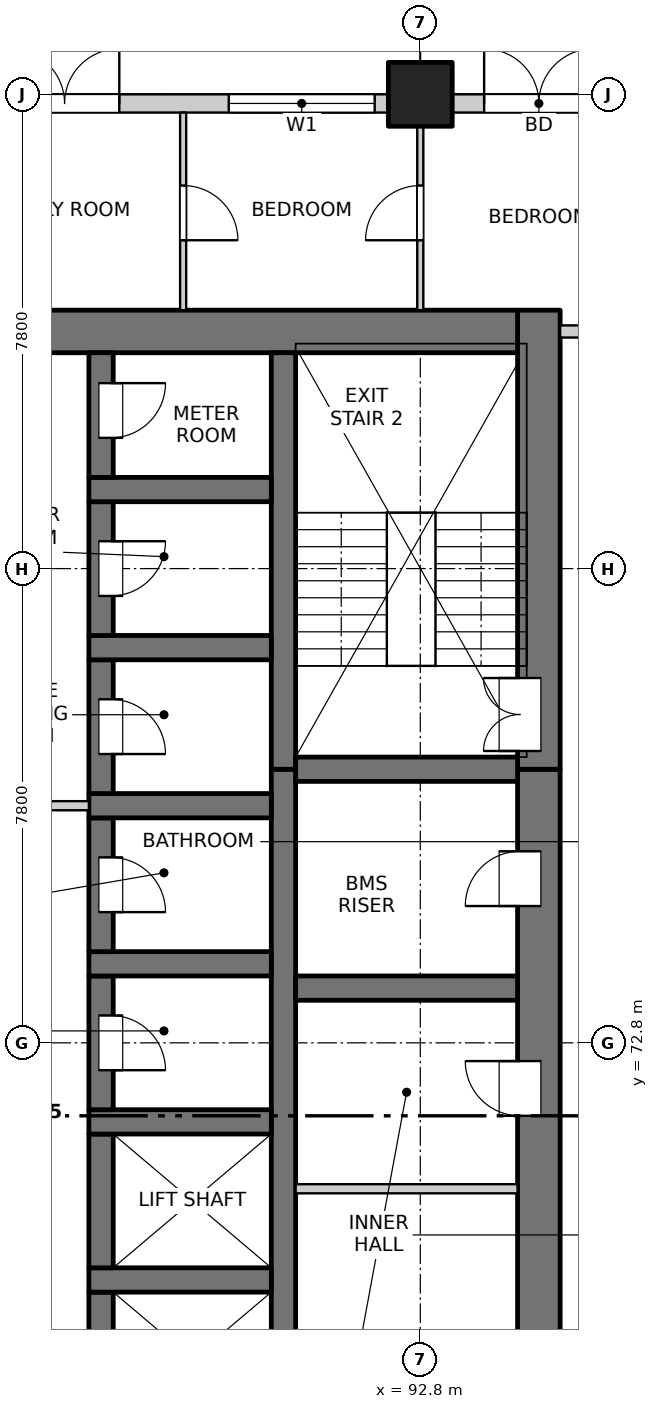
"""IFC4 building model, lengths in metres.
Left out: names, types, materials, properties, quantities, classifications, styles, units other than length and angle.
Written with IfcOpenShell. Run it as: python <this file> out.ifc"""

import sys

from ifc_helpers import new_model, si_unit, direction, frame, frame_2d, origin, origin_2d, place, context, subcontext, project, spatial, rectangle, extrude, element, fill, save


model = new_model("IFC4")
c1 = context("Model", 3, precision=1e-05, world=origin(), true_north=direction((0.0, 1.0)))
c2 = subcontext(c1, "Body", "Model", "MODEL_VIEW")
j1 = project(units=[si_unit("LENGTHUNIT", "METRE"), si_unit("PLANEANGLEUNIT", "RADIAN")], contexts=[c1])
p1 = place(None, origin())
s1 = spatial("IfcSite", under=j1, at=p1, CompositionType="ELEMENT")
p2 = place(p1, origin())
s2 = spatial("IfcBuilding", under=s1, at=p2, CompositionType="ELEMENT")
p3 = place(p2, frame((0.0, 0.0, 39.9)))
s3 = spatial("IfcBuildingStorey", under=s2, at=p3, CompositionType="ELEMENT", Elevation=39.9)
p4 = place(p3, frame((92.8, 88.4, -0.25), z_axis=(0.0, 0.0, 1.0), x_axis=(1.0, 0.0, 0.0)))
e1 = element("IfcColumn", 1, at=p4, inside=s3, PredefinedType="COLUMN", context=c2, shape_type="SweptSolid", body=[
    extrude(rectangle(XDim=1.05, YDim=1.05, at=origin_2d()), origin(), (0.0, 0.0, 1.0), 3.4),
])
p5 = place(p3, frame((94.75, 61.95, -0.25), z_axis=(0.0, 0.0, 1.0), x_axis=(0.0, 1.0, 0.0)))
e2 = element("IfcWall", 2, at=p5, inside=s3, PredefinedType="SOLIDWALL", context=c2, shape_type="SweptSolid", body=[
    extrude(rectangle(XDim=15.35, YDim=0.7, at=frame_2d((7.675, 0.0))), origin(), (0.0, 0.0, 1.0), 3.4),
])
p6 = place(p5, frame((0.925, 0.0, 0.25)))
e3 = element("IfcOpeningElement", 3, at=p6, cuts=e2, PredefinedType="OPENING", context=c2, shape_type="SweptSolid", body=[
    extrude(rectangle(XDim=0.9, YDim=2.1, at=frame_2d((0.45, 1.05))), frame((0.0, 0.36, 0.0), z_axis=(0.0, -1.0, 0.0), x_axis=(1.0, 0.0, 0.0)), (0.0, 0.0, 1.0), 0.72),
])
p7 = place(p5, frame((5.15, 0.0, 0.25)))
e4 = element("IfcOpeningElement", 4, at=p7, cuts=e2, PredefinedType="OPENING", context=c2, shape_type="SweptSolid", body=[
    extrude(rectangle(XDim=0.9, YDim=2.1, at=frame_2d((0.45, 1.05))), frame((0.0, 0.36, 0.0), z_axis=(0.0, -1.0, 0.0), x_axis=(1.0, 0.0, 0.0)), (0.0, 0.0, 1.0), 0.72),
])
p8 = place(p5, frame((9.65, 0.0, 0.25)))
e5 = element("IfcOpeningElement", 5, at=p8, cuts=e2, PredefinedType="OPENING", context=c2, shape_type="SweptSolid", body=[
    extrude(rectangle(XDim=0.9, YDim=2.1, at=frame_2d((0.45, 1.05))), frame((0.0, 0.36, 0.0), z_axis=(0.0, -1.0, 0.0), x_axis=(1.0, 0.0, 0.0)), (0.0, 0.0, 1.0), 0.72),
])
p9 = place(p5, frame((13.1, 0.0, 0.25)))
e6 = element("IfcOpeningElement", 6, at=p9, cuts=e2, PredefinedType="OPENING", context=c2, shape_type="SweptSolid", body=[
    extrude(rectangle(XDim=0.9, YDim=2.1, at=frame_2d((0.45, 1.05))), frame((0.0, 0.36, 0.0), z_axis=(0.0, -1.0, 0.0), x_axis=(1.0, 0.0, 0.0)), (0.0, 0.0, 1.0), 0.72),
])
p10 = place(p3, frame((94.75, 77.3, -0.25), z_axis=(0.0, 0.0, 1.0), x_axis=(0.0, 1.0, 0.0)))
e7 = element("IfcWall", 7, at=p10, inside=s3, PredefinedType="SOLIDWALL", context=c2, shape_type="SweptSolid", body=[
    extrude(rectangle(XDim=7.55, YDim=0.7, at=frame_2d((3.775, 0.0))), origin(), (0.0, 0.0, 1.0), 3.4),
])
p11 = place(p10, frame((0.3, 0.0, 0.25)))
e8 = element("IfcOpeningElement", 8, at=p11, cuts=e7, PredefinedType="OPENING", context=c2, shape_type="SweptSolid", body=[
    extrude(rectangle(XDim=1.2, YDim=2.1, at=frame_2d((0.6, 1.05))), frame((0.0, 0.36, 0.0), z_axis=(0.0, -1.0, 0.0), x_axis=(1.0, 0.0, 0.0)), (0.0, 0.0, 1.0), 0.72),
])
p12 = place(p3, frame((75.6, 84.5, -0.25), z_axis=(0.0, 0.0, 1.0), x_axis=(1.0, 0.0, 0.0)))
e9 = element("IfcWall", 9, at=p12, inside=s3, PredefinedType="SOLIDWALL", context=c2, shape_type="SweptSolid", body=[
    extrude(rectangle(XDim=18.8, YDim=0.7, at=frame_2d((9.4, 0.0))), origin(), (0.0, 0.0, 1.0), 3.4),
])
p13 = place(p3, frame((90.55, 61.95, -0.25), z_axis=(0.0, 0.0, 1.0), x_axis=(0.0, 1.0, 0.0)))
e10 = element("IfcWall", 10, at=p13, inside=s3, PredefinedType="SOLIDWALL", context=c2, shape_type="SweptSolid", body=[
    extrude(rectangle(XDim=15.35, YDim=0.4, at=frame_2d((7.675, 0.0))), origin(), (0.0, 0.0, 1.0), 3.4),
])
p14 = place(p3, frame((90.55, 77.3, -0.25), z_axis=(0.0, 0.0, 1.0), x_axis=(0.0, 1.0, 0.0)))
e11 = element("IfcWall", 11, at=p14, inside=s3, PredefinedType="SOLIDWALL", context=c2, shape_type="SweptSolid", body=[
    extrude(rectangle(XDim=6.85, YDim=0.4, at=frame_2d((3.425, 0.0))), origin(), (0.0, 0.0, 1.0), 3.4),
])
p15 = place(p3, frame((87.55, 66.5, -0.25), z_axis=(0.0, 0.0, 1.0), x_axis=(0.0, 1.0, 0.0)))
e12 = element("IfcWall", 12, at=p15, inside=s3, PredefinedType="SOLIDWALL", context=c2, shape_type="SweptSolid", body=[
    extrude(rectangle(XDim=2.2, YDim=0.4, at=frame_2d((1.1, 0.0))), origin(), (0.0, 0.0, 1.0), 3.4),
])
p16 = place(p3, frame((87.35, 68.9, -0.25), z_axis=(0.0, 0.0, 1.0), x_axis=(1.0, 0.0, 0.0)))
e13 = element("IfcWall", 13, at=p16, inside=s3, PredefinedType="SOLIDWALL", context=c2, shape_type="SweptSolid", body=[
    extrude(rectangle(XDim=3.0, YDim=0.4, at=frame_2d((1.5, 0.0))), origin(), (0.0, 0.0, 1.0), 3.4),
])
p17 = place(p3, frame((87.55, 69.1, -0.25), z_axis=(0.0, 0.0, 1.0), x_axis=(0.0, 1.0, 0.0)))
e14 = element("IfcWall", 14, at=p17, inside=s3, PredefinedType="SOLIDWALL", context=c2, shape_type="SweptSolid", body=[
    extrude(rectangle(XDim=2.2, YDim=0.4, at=frame_2d((1.1, 0.0))), origin(), (0.0, 0.0, 1.0), 3.4),
])
p18 = place(p3, frame((87.35, 71.5, -0.25), z_axis=(0.0, 0.0, 1.0), x_axis=(1.0, 0.0, 0.0)))
e15 = element("IfcWall", 15, at=p18, inside=s3, PredefinedType="SOLIDWALL", context=c2, shape_type="SweptSolid", body=[
    extrude(rectangle(XDim=3.0, YDim=0.4, at=frame_2d((1.5, 0.0))), origin(), (0.0, 0.0, 1.0), 3.4),
])
p19 = place(p3, frame((87.55, 71.7, -0.25), z_axis=(0.0, 0.0, 1.0), x_axis=(0.0, 1.0, 0.0)))
e16 = element("IfcWall", 16, at=p19, inside=s3, PredefinedType="SOLIDWALL", context=c2, shape_type="SweptSolid", body=[
    extrude(rectangle(XDim=2.2, YDim=0.4, at=frame_2d((1.1, 0.0))), origin(), (0.0, 0.0, 1.0), 3.4),
])
p20 = place(p19, frame((0.65, 0.0, 0.25)))
e17 = element("IfcOpeningElement", 17, at=p20, cuts=e16, PredefinedType="OPENING", context=c2, shape_type="SweptSolid", body=[
    extrude(rectangle(XDim=0.9, YDim=2.1, at=frame_2d((0.45, 1.05))), frame((0.0, 0.21, 0.0), z_axis=(0.0, -1.0, 0.0), x_axis=(1.0, 0.0, 0.0)), (0.0, 0.0, 1.0), 0.42),
])
p21 = place(p3, frame((87.35, 74.1, -0.25), z_axis=(0.0, 0.0, 1.0), x_axis=(1.0, 0.0, 0.0)))
e18 = element("IfcWall", 18, at=p21, inside=s3, PredefinedType="SOLIDWALL", context=c2, shape_type="SweptSolid", body=[
    extrude(rectangle(XDim=3.0, YDim=0.4, at=frame_2d((1.5, 0.0))), origin(), (0.0, 0.0, 1.0), 3.4),
])
p22 = place(p3, frame((87.55, 74.3, -0.25), z_axis=(0.0, 0.0, 1.0), x_axis=(0.0, 1.0, 0.0)))
e19 = element("IfcWall", 19, at=p22, inside=s3, PredefinedType="SOLIDWALL", context=c2, shape_type="SweptSolid", body=[
    extrude(rectangle(XDim=2.2, YDim=0.4, at=frame_2d((1.1, 0.0))), origin(), (0.0, 0.0, 1.0), 3.4),
])
p23 = place(p22, frame((0.65, 0.0, 0.25)))
e20 = element("IfcOpeningElement", 20, at=p23, cuts=e19, PredefinedType="OPENING", context=c2, shape_type="SweptSolid", body=[
    extrude(rectangle(XDim=0.9, YDim=2.1, at=frame_2d((0.45, 1.05))), frame((0.0, 0.21, 0.0), z_axis=(0.0, -1.0, 0.0), x_axis=(1.0, 0.0, 0.0)), (0.0, 0.0, 1.0), 0.42),
])
p24 = place(p3, frame((87.35, 76.7, -0.25), z_axis=(0.0, 0.0, 1.0), x_axis=(1.0, 0.0, 0.0)))
e21 = element("IfcWall", 21, at=p24, inside=s3, PredefinedType="SOLIDWALL", context=c2, shape_type="SweptSolid", body=[
    extrude(rectangle(XDim=3.0, YDim=0.4, at=frame_2d((1.5, 0.0))), origin(), (0.0, 0.0, 1.0), 3.4),
])
p25 = place(p3, frame((87.55, 76.9, -0.25), z_axis=(0.0, 0.0, 1.0), x_axis=(0.0, 1.0, 0.0)))
e22 = element("IfcWall", 22, at=p25, inside=s3, PredefinedType="SOLIDWALL", context=c2, shape_type="SweptSolid", body=[
    extrude(rectangle(XDim=2.2, YDim=0.4, at=frame_2d((1.1, 0.0))), origin(), (0.0, 0.0, 1.0), 3.4),
])
p26 = place(p25, frame((0.65, 0.0, 0.25)))
e23 = element("IfcOpeningElement", 23, at=p26, cuts=e22, PredefinedType="OPENING", context=c2, shape_type="SweptSolid", body=[
    extrude(rectangle(XDim=0.9, YDim=2.1, at=frame_2d((0.45, 1.05))), frame((0.0, 0.21, 0.0), z_axis=(0.0, -1.0, 0.0), x_axis=(1.0, 0.0, 0.0)), (0.0, 0.0, 1.0), 0.42),
])
p27 = place(p3, frame((87.35, 79.3, -0.25), z_axis=(0.0, 0.0, 1.0), x_axis=(1.0, 0.0, 0.0)))
e24 = element("IfcWall", 24, at=p27, inside=s3, PredefinedType="SOLIDWALL", context=c2, shape_type="SweptSolid", body=[
    extrude(rectangle(XDim=3.0, YDim=0.4, at=frame_2d((1.5, 0.0))), origin(), (0.0, 0.0, 1.0), 3.4),
])
p28 = place(p3, frame((87.55, 79.5, -0.25), z_axis=(0.0, 0.0, 1.0), x_axis=(0.0, 1.0, 0.0)))
e25 = element("IfcWall", 25, at=p28, inside=s3, PredefinedType="SOLIDWALL", context=c2, shape_type="SweptSolid", body=[
    extrude(rectangle(XDim=2.2, YDim=0.4, at=frame_2d((1.1, 0.0))), origin(), (0.0, 0.0, 1.0), 3.4),
])
p29 = place(p28, frame((0.65, 0.0, 0.25)))
e26 = element("IfcOpeningElement", 26, at=p29, cuts=e25, PredefinedType="OPENING", context=c2, shape_type="SweptSolid", body=[
    extrude(rectangle(XDim=0.9, YDim=2.1, at=frame_2d((0.45, 1.05))), frame((0.0, 0.21, 0.0), z_axis=(0.0, -1.0, 0.0), x_axis=(1.0, 0.0, 0.0)), (0.0, 0.0, 1.0), 0.42),
])
p30 = place(p3, frame((87.35, 81.9, -0.25), z_axis=(0.0, 0.0, 1.0), x_axis=(1.0, 0.0, 0.0)))
e27 = element("IfcWall", 27, at=p30, inside=s3, PredefinedType="SOLIDWALL", context=c2, shape_type="SweptSolid", body=[
    extrude(rectangle(XDim=3.0, YDim=0.4, at=frame_2d((1.5, 0.0))), origin(), (0.0, 0.0, 1.0), 3.4),
])
p31 = place(p3, frame((87.55, 82.1, -0.25), z_axis=(0.0, 0.0, 1.0), x_axis=(0.0, 1.0, 0.0)))
e28 = element("IfcWall", 28, at=p31, inside=s3, PredefinedType="SOLIDWALL", context=c2, shape_type="SweptSolid", body=[
    extrude(rectangle(XDim=2.05, YDim=0.4, at=frame_2d((1.025, 0.0))), origin(), (0.0, 0.0, 1.0), 3.4),
])
p32 = place(p31, frame((0.65, 0.0, 0.25)))
e29 = element("IfcOpeningElement", 29, at=p32, cuts=e28, PredefinedType="OPENING", context=c2, shape_type="SweptSolid", body=[
    extrude(rectangle(XDim=0.9, YDim=2.1, at=frame_2d((0.45, 1.05))), frame((0.0, 0.21, 0.0), z_axis=(0.0, -1.0, 0.0), x_axis=(1.0, 0.0, 0.0)), (0.0, 0.0, 1.0), 0.42),
])
for number, where, z_axis, x_axis in (
    (30, (90.75, 73.7, -0.25), (0.0, 0.0, 1.0), (1.0, 0.0, 0.0)),
    (31, (90.75, 77.3, -0.25), (0.0, 0.0, 1.0), (1.0, 0.0, 0.0)),
):
    element("IfcWall", number, at=place(p3, frame(where, z_axis=z_axis, x_axis=x_axis)), inside=s3, PredefinedType="SOLIDWALL", context=c2, shape_type="SweptSolid", body=[
        extrude(rectangle(XDim=3.65, YDim=0.4, at=frame_2d((1.825, 0.0))), origin(), (0.0, 0.0, 1.0), 3.4),
    ])
p33 = place(p3, frame((85.525, 88.25, 0.0), z_axis=(0.0, 0.0, 1.0), x_axis=(1.0, 0.0, 0.0)))
e32 = element("IfcWall", 32, at=p33, inside=s3, PredefinedType="SOLIDWALL", context=c2, shape_type="SweptSolid", body=[
    extrude(rectangle(XDim=6.75, YDim=0.3, at=frame_2d((3.375, 0.0))), origin(), (0.0, 0.0, 1.0), 2.7),
])
p34 = place(p33, frame((0.525, 0.0, 0.0)))
e33 = element("IfcOpeningElement", 33, at=p34, cuts=e32, PredefinedType="OPENING", context=c2, shape_type="SweptSolid", body=[
    extrude(rectangle(XDim=1.8, YDim=2.4, at=frame_2d((0.9, 1.2))), frame((0.0, 0.16, 0.0), z_axis=(0.0, -1.0, 0.0), x_axis=(1.0, 0.0, 0.0)), (0.0, 0.0, 1.0), 0.32),
])
p35 = place(p33, frame((4.125, 0.0, 0.9)))
e34 = element("IfcOpeningElement", 34, at=p35, cuts=e32, PredefinedType="OPENING", context=c2, shape_type="SweptSolid", body=[
    extrude(rectangle(XDim=2.4, YDim=1.8, at=frame_2d((1.2, 0.9))), frame((0.0, 0.16, 0.0), z_axis=(0.0, -1.0, 0.0), x_axis=(1.0, 0.0, 0.0)), (0.0, 0.0, 1.0), 0.32),
])
p36 = place(p3, frame((93.325, 88.25, 0.0), z_axis=(0.0, 0.0, 1.0), x_axis=(1.0, 0.0, 0.0)))
e35 = element("IfcWall", 35, at=p36, inside=s3, PredefinedType="SOLIDWALL", context=c2, shape_type="SweptSolid", body=[
    extrude(rectangle(XDim=6.75, YDim=0.3, at=frame_2d((3.375, 0.0))), origin(), (0.0, 0.0, 1.0), 2.7),
])
p37 = place(p36, frame((0.525, 0.0, 0.0)))
e36 = element("IfcOpeningElement", 36, at=p37, cuts=e35, PredefinedType="OPENING", context=c2, shape_type="SweptSolid", body=[
    extrude(rectangle(XDim=1.8, YDim=2.4, at=frame_2d((0.9, 1.2))), frame((0.0, 0.16, 0.0), z_axis=(0.0, -1.0, 0.0), x_axis=(1.0, 0.0, 0.0)), (0.0, 0.0, 1.0), 0.32),
])
p38 = place(p36, frame((4.125, 0.0, 0.9)))
e37 = element("IfcOpeningElement", 37, at=p38, cuts=e35, PredefinedType="OPENING", context=c2, shape_type="SweptSolid", body=[
    extrude(rectangle(XDim=2.4, YDim=1.8, at=frame_2d((1.2, 0.9))), frame((0.0, 0.16, 0.0), z_axis=(0.0, -1.0, 0.0), x_axis=(1.0, 0.0, 0.0)), (0.0, 0.0, 1.0), 0.32),
])
p39 = place(p3, frame((90.75, 70.4, 0.0), z_axis=(0.0, 0.0, 1.0), x_axis=(1.0, 0.0, 0.0)))
e38 = element("IfcWall", 38, at=p39, inside=s3, PredefinedType="PARTITIONING", context=c2, shape_type="SweptSolid", body=[
    extrude(rectangle(XDim=3.65, YDim=0.15, at=frame_2d((1.825, 0.0))), origin(), (0.0, 0.0, 1.0), 3.15),
])
p40 = place(p3, frame((82.65, 76.7, 0.0), z_axis=(0.0, 0.0, 1.0), x_axis=(1.0, 0.0, 0.0)))
e39 = element("IfcWall", 39, at=p40, inside=s3, PredefinedType="PARTITIONING", context=c2, shape_type="SweptSolid", body=[
    extrude(rectangle(XDim=4.7, YDim=0.15, at=frame_2d((2.35, 0.0))), origin(), (0.0, 0.0, 1.0), 3.15),
])
p41 = place(p40, frame((1.45, 0.0, 0.0)))
e40 = element("IfcOpeningElement", 40, at=p41, cuts=e39, PredefinedType="OPENING", context=c2, shape_type="SweptSolid", body=[
    extrude(rectangle(XDim=1.8, YDim=2.1, at=frame_2d((0.9, 1.05))), frame((0.0, 0.085, 0.0), z_axis=(0.0, -1.0, 0.0), x_axis=(1.0, 0.0, 0.0)), (0.0, 0.0, 1.0), 0.17),
])
p42 = place(p3, frame((95.1, 84.5, 0.0), z_axis=(0.0, 0.0, 1.0), x_axis=(1.0, 0.0, 0.0)))
e41 = element("IfcWall", 41, at=p42, inside=s3, PredefinedType="PARTITIONING", context=c2, shape_type="SweptSolid", body=[
    extrude(rectangle(XDim=1.7, YDim=0.2, at=frame_2d((0.85, 0.0))), origin(), (0.0, 0.0, 1.0), 3.15),
])
p43 = place(p3, frame((88.9, 84.85, 0.0), z_axis=(0.0, 0.0, 1.0), x_axis=(0.0, 1.0, 0.0)))
e42 = element("IfcWall", 42, at=p43, inside=s3, PredefinedType="PARTITIONING", context=c2, shape_type="SweptSolid", body=[
    extrude(rectangle(XDim=3.25, YDim=0.1, at=frame_2d((1.625, 0.0))), origin(), (0.0, 0.0, 1.0), 3.15),
])
p44 = place(p43, frame((1.15, 0.0, 0.0)))
e43 = element("IfcOpeningElement", 43, at=p44, cuts=e42, PredefinedType="OPENING", context=c2, shape_type="SweptSolid", body=[
    extrude(rectangle(XDim=0.9, YDim=2.1, at=frame_2d((0.45, 1.05))), frame((0.0, 0.06, 0.0), z_axis=(0.0, -1.0, 0.0), x_axis=(1.0, 0.0, 0.0)), (0.0, 0.0, 1.0), 0.12),
])
p45 = place(p3, frame((92.8, 84.85, 0.0), z_axis=(0.0, 0.0, 1.0), x_axis=(0.0, 1.0, 0.0)))
e44 = element("IfcWall", 44, at=p45, inside=s3, PredefinedType="PARTITIONING", context=c2, shape_type="SweptSolid", body=[
    extrude(rectangle(XDim=3.25, YDim=0.1, at=frame_2d((1.625, 0.0))), origin(), (0.0, 0.0, 1.0), 3.15),
])
p46 = place(p45, frame((1.15, 0.0, 0.0)))
e45 = element("IfcOpeningElement", 45, at=p46, cuts=e44, PredefinedType="OPENING", context=c2, shape_type="SweptSolid", body=[
    extrude(rectangle(XDim=0.9, YDim=2.1, at=frame_2d((0.45, 1.05))), frame((0.0, 0.06, 0.0), z_axis=(0.0, -1.0, 0.0), x_axis=(1.0, 0.0, 0.0)), (0.0, 0.0, 1.0), 0.12),
])
p47 = place(p34, origin())
e46 = element("IfcDoor", 46, at=p47, inside=s3, OperationType="DOUBLE_DOOR_SINGLE_SWING", PredefinedType="DOOR", context=c2, shape_type="SweptSolid", body=[
    extrude(rectangle(XDim=1.8, YDim=2.4, at=frame_2d((0.9, 1.2))), frame((0.0, 0.025, 0.0), z_axis=(0.0, -1.0, 0.0), x_axis=(1.0, 0.0, 0.0)), (0.0, 0.0, 1.0), 0.05),
])
fill(e33, e46)
p48 = place(p35, origin())
e47 = element("IfcWindow", 47, at=p48, inside=s3, PartitioningType="DOUBLE_PANEL_VERTICAL", PredefinedType="WINDOW", context=c2, shape_type="SweptSolid", body=[
    extrude(rectangle(XDim=2.4, YDim=1.8, at=frame_2d((1.2, 0.9))), frame((0.0, 0.03, 0.0), z_axis=(0.0, -1.0, 0.0), x_axis=(1.0, 0.0, 0.0)), (0.0, 0.0, 1.0), 0.06),
])
fill(e34, e47)
p49 = place(p37, origin())
e48 = element("IfcDoor", 48, at=p49, inside=s3, OperationType="DOUBLE_DOOR_SINGLE_SWING", PredefinedType="DOOR", context=c2, shape_type="SweptSolid", body=[
    extrude(rectangle(XDim=1.8, YDim=2.4, at=frame_2d((0.9, 1.2))), frame((0.0, 0.025, 0.0), z_axis=(0.0, -1.0, 0.0), x_axis=(1.0, 0.0, 0.0)), (0.0, 0.0, 1.0), 0.05),
])
fill(e36, e48)
p50 = place(p8, origin())
e49 = element("IfcDoor", 49, at=p50, inside=s3, OperationType="SINGLE_SWING_RIGHT", PredefinedType="DOOR", context=c2, shape_type="SweptSolid", body=[
    extrude(rectangle(XDim=0.9, YDim=2.1, at=frame_2d((0.45, 1.05))), frame((0.0, 0.335, 0.0), z_axis=(0.0, -1.0, 0.0), x_axis=(1.0, 0.0, 0.0)), (0.0, 0.0, 1.0), 0.05),
])
fill(e5, e49)
p51 = place(p20, origin())
e50 = element("IfcDoor", 50, at=p51, inside=s3, OperationType="SINGLE_SWING_RIGHT", PredefinedType="DOOR", context=c2, shape_type="SweptSolid", body=[
    extrude(rectangle(XDim=0.9, YDim=2.1, at=frame_2d((0.45, 1.05))), frame((0.0, -0.135, 0.0), z_axis=(0.0, -1.0, 0.0), x_axis=(1.0, 0.0, 0.0)), (0.0, 0.0, 1.0), 0.05),
])
fill(e17, e50)
p52 = place(p23, origin())
e51 = element("IfcDoor", 51, at=p52, inside=s3, OperationType="SINGLE_SWING_RIGHT", PredefinedType="DOOR", context=c2, shape_type="SweptSolid", body=[
    extrude(rectangle(XDim=0.9, YDim=2.1, at=frame_2d((0.45, 1.05))), frame((0.0, -0.135, 0.0), z_axis=(0.0, -1.0, 0.0), x_axis=(1.0, 0.0, 0.0)), (0.0, 0.0, 1.0), 0.05),
])
fill(e20, e51)
p53 = place(p9, origin())
e52 = element("IfcDoor", 52, at=p53, inside=s3, OperationType="SINGLE_SWING_LEFT", PredefinedType="DOOR", context=c2, shape_type="SweptSolid", body=[
    extrude(rectangle(XDim=0.9, YDim=2.1, at=frame_2d((0.45, 1.05))), frame((0.0, 0.335, 0.0), z_axis=(0.0, -1.0, 0.0), x_axis=(1.0, 0.0, 0.0)), (0.0, 0.0, 1.0), 0.05),
])
fill(e6, e52)
p54 = place(p26, origin())
e53 = element("IfcDoor", 53, at=p54, inside=s3, OperationType="SINGLE_SWING_RIGHT", PredefinedType="DOOR", context=c2, shape_type="SweptSolid", body=[
    extrude(rectangle(XDim=0.9, YDim=2.1, at=frame_2d((0.45, 1.05))), frame((0.0, -0.135, 0.0), z_axis=(0.0, -1.0, 0.0), x_axis=(1.0, 0.0, 0.0)), (0.0, 0.0, 1.0), 0.05),
])
fill(e23, e53)
p55 = place(p11, origin())
e54 = element("IfcDoor", 54, at=p55, inside=s3, OperationType="DOUBLE_DOOR_SINGLE_SWING", PredefinedType="DOOR", context=c2, shape_type="SweptSolid", body=[
    extrude(rectangle(XDim=1.2, YDim=2.1, at=frame_2d((0.6, 1.05))), frame((0.0, 0.335, 0.0), z_axis=(0.0, -1.0, 0.0), x_axis=(1.0, 0.0, 0.0)), (0.0, 0.0, 1.0), 0.05),
])
fill(e8, e54)
p56 = place(p29, origin())
e55 = element("IfcDoor", 55, at=p56, inside=s3, OperationType="SINGLE_SWING_LEFT", PredefinedType="DOOR", context=c2, shape_type="SweptSolid", body=[
    extrude(rectangle(XDim=0.9, YDim=2.1, at=frame_2d((0.45, 1.05))), frame((0.0, -0.135, 0.0), z_axis=(0.0, -1.0, 0.0), x_axis=(1.0, 0.0, 0.0)), (0.0, 0.0, 1.0), 0.05),
])
fill(e26, e55)
p57 = place(p32, origin())
e56 = element("IfcDoor", 56, at=p57, inside=s3, OperationType="SINGLE_SWING_LEFT", PredefinedType="DOOR", context=c2, shape_type="SweptSolid", body=[
    extrude(rectangle(XDim=0.9, YDim=2.1, at=frame_2d((0.45, 1.05))), frame((0.0, -0.135, 0.0), z_axis=(0.0, -1.0, 0.0), x_axis=(1.0, 0.0, 0.0)), (0.0, 0.0, 1.0), 0.05),
])
fill(e29, e56)
p58 = place(p44, origin())
e57 = element("IfcDoor", 57, at=p58, inside=s3, OperationType="SINGLE_SWING_RIGHT", PredefinedType="DOOR", context=c2, shape_type="SweptSolid", body=[
    extrude(rectangle(XDim=0.9, YDim=2.1, at=frame_2d((0.45, 1.05))), frame((0.0, 0.025, 0.0), z_axis=(0.0, -1.0, 0.0), x_axis=(1.0, 0.0, 0.0)), (0.0, 0.0, 1.0), 0.05),
])
fill(e43, e57)
p59 = place(p46, origin())
e58 = element("IfcDoor", 58, at=p59, inside=s3, OperationType="SINGLE_SWING_LEFT", PredefinedType="DOOR", context=c2, shape_type="SweptSolid", body=[
    extrude(rectangle(XDim=0.9, YDim=2.1, at=frame_2d((0.45, 1.05))), frame((0.0, 0.025, 0.0), z_axis=(0.0, -1.0, 0.0), x_axis=(1.0, 0.0, 0.0)), (0.0, 0.0, 1.0), 0.05),
])
fill(e45, e58)
save(model, sys.argv[1])
